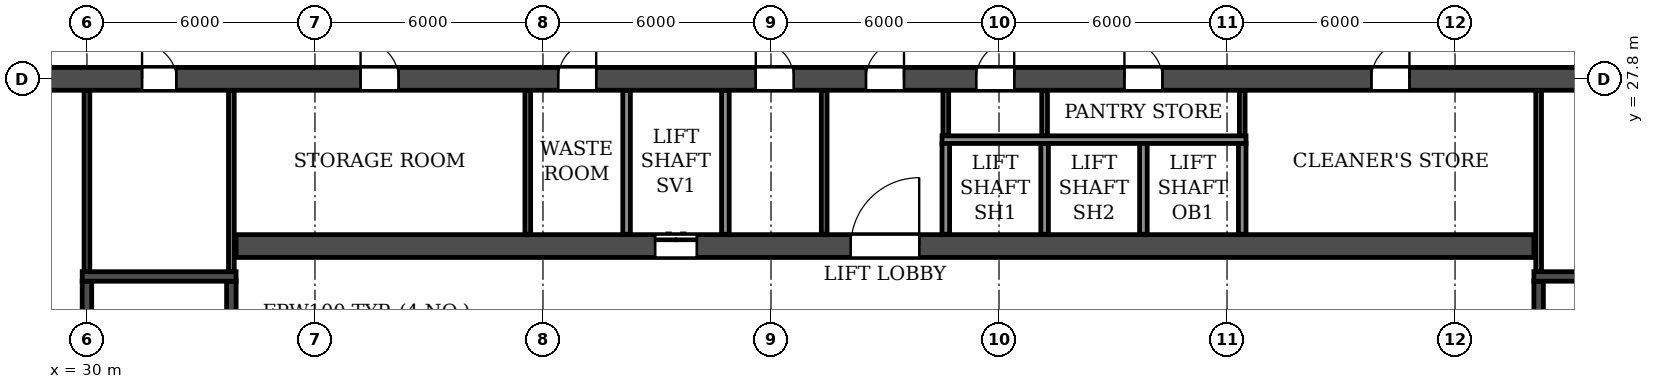
"""IFC4 building model, lengths in metres.
Left out: names, types, materials, properties, quantities, classifications, styles, units other than length and angle.
Written with IfcOpenShell. Run it as: python <this file> out.ifc"""

import sys

from ifc_helpers import new_model, si_unit, direction, frame, frame_2d, origin, place, context, subcontext, project, spatial, rectangle, extrude, element, fill, save


model = new_model("IFC4")
c1 = context("Model", 3, precision=1e-05, world=origin(), true_north=direction((0.0, 1.0)))
c2 = subcontext(c1, "Body", "Model", "MODEL_VIEW")
j1 = project(units=[si_unit("LENGTHUNIT", "METRE"), si_unit("PLANEANGLEUNIT", "RADIAN")], contexts=[c1])
p1 = place(None, origin())
s1 = spatial("IfcSite", under=j1, at=p1, CompositionType="ELEMENT")
p2 = place(p1, origin())
s2 = spatial("IfcBuilding", under=s1, at=p2, CompositionType="ELEMENT")
p3 = place(p2, frame((0.0, 0.0, 33.3)))
s3 = spatial("IfcBuildingStorey", under=s2, at=p3, CompositionType="ELEMENT", Elevation=33.3)
p4 = place(p3, frame((2.6, 27.8, 0.0), z_axis=(0.0, 0.0, 1.0), x_axis=(1.0, 0.0, 0.0)))
e1 = element("IfcWall", 1, at=p4, inside=s3, PredefinedType="SOLIDWALL", context=c2, shape_type="SweptSolid", body=[
    extrude(rectangle(XDim=96.8, YDim=0.6, at=frame_2d((48.4, 0.0))), origin(), (0.0, 0.0, 1.0), 3.05),
])
p5 = place(p4, frame((2.55, 0.0, 0.0)))
e2 = element("IfcOpeningElement", 2, at=p5, cuts=e1, PredefinedType="OPENING", context=c2, shape_type="SweptSolid", body=[
    extrude(rectangle(XDim=1.0, YDim=2.1, at=frame_2d((0.5, 1.05))), frame((0.0, 0.31, 0.0), z_axis=(0.0, -1.0, 0.0), x_axis=(1.0, 0.0, 0.0)), (0.0, 0.0, 1.0), 0.62),
])
p6 = place(p4, frame((10.25, 0.0, 0.0)))
e3 = element("IfcOpeningElement", 3, at=p6, cuts=e1, PredefinedType="OPENING", context=c2, shape_type="SweptSolid", body=[
    extrude(rectangle(XDim=1.0, YDim=2.1, at=frame_2d((0.5, 1.05))), frame((0.0, 0.31, 0.0), z_axis=(0.0, -1.0, 0.0), x_axis=(1.0, 0.0, 0.0)), (0.0, 0.0, 1.0), 0.62),
])
p7 = place(p4, frame((16.3, 0.0, 0.0)))
e4 = element("IfcOpeningElement", 4, at=p7, cuts=e1, PredefinedType="OPENING", context=c2, shape_type="SweptSolid", body=[
    extrude(rectangle(XDim=1.0, YDim=2.1, at=frame_2d((0.5, 1.05))), frame((0.0, 0.31, 0.0), z_axis=(0.0, -1.0, 0.0), x_axis=(1.0, 0.0, 0.0)), (0.0, 0.0, 1.0), 0.62),
])
p8 = place(p4, frame((19.65, 0.0, 0.0)))
e5 = element("IfcOpeningElement", 5, at=p8, cuts=e1, PredefinedType="OPENING", context=c2, shape_type="SweptSolid", body=[
    extrude(rectangle(XDim=0.9, YDim=2.1, at=frame_2d((0.45, 1.05))), frame((0.0, 0.31, 0.0), z_axis=(0.0, -1.0, 0.0), x_axis=(1.0, 0.0, 0.0)), (0.0, 0.0, 1.0), 0.62),
])
p9 = place(p4, frame((28.85, 0.0, 0.0)))
e6 = element("IfcOpeningElement", 6, at=p9, cuts=e1, PredefinedType="OPENING", context=c2, shape_type="SweptSolid", body=[
    extrude(rectangle(XDim=0.9, YDim=2.1, at=frame_2d((0.45, 1.05))), frame((0.0, 0.31, 0.0), z_axis=(0.0, -1.0, 0.0), x_axis=(1.0, 0.0, 0.0)), (0.0, 0.0, 1.0), 0.62),
])
p10 = place(p4, frame((34.6, 0.0, 0.0)))
e7 = element("IfcOpeningElement", 7, at=p10, cuts=e1, PredefinedType="OPENING", context=c2, shape_type="SweptSolid", body=[
    extrude(rectangle(XDim=1.0, YDim=2.1, at=frame_2d((0.5, 1.05))), frame((0.0, 0.31, 0.0), z_axis=(0.0, -1.0, 0.0), x_axis=(1.0, 0.0, 0.0)), (0.0, 0.0, 1.0), 0.62),
])
p11 = place(p4, frame((39.8, 0.0, 0.0)))
e8 = element("IfcOpeningElement", 8, at=p11, cuts=e1, PredefinedType="OPENING", context=c2, shape_type="SweptSolid", body=[
    extrude(rectangle(XDim=1.0, YDim=2.1, at=frame_2d((0.5, 1.05))), frame((0.0, 0.31, 0.0), z_axis=(0.0, -1.0, 0.0), x_axis=(1.0, 0.0, 0.0)), (0.0, 0.0, 1.0), 0.62),
])
p12 = place(p4, frame((45.0, 0.0, 0.0)))
e9 = element("IfcOpeningElement", 9, at=p12, cuts=e1, PredefinedType="OPENING", context=c2, shape_type="SweptSolid", body=[
    extrude(rectangle(XDim=1.0, YDim=2.1, at=frame_2d((0.5, 1.05))), frame((0.0, 0.31, 0.0), z_axis=(0.0, -1.0, 0.0), x_axis=(1.0, 0.0, 0.0)), (0.0, 0.0, 1.0), 0.62),
])
p13 = place(p4, frame((47.9, 0.0, 0.0)))
e10 = element("IfcOpeningElement", 10, at=p13, cuts=e1, PredefinedType="OPENING", context=c2, shape_type="SweptSolid", body=[
    extrude(rectangle(XDim=1.0, YDim=2.1, at=frame_2d((0.5, 1.05))), frame((0.0, 0.31, 0.0), z_axis=(0.0, -1.0, 0.0), x_axis=(1.0, 0.0, 0.0)), (0.0, 0.0, 1.0), 0.62),
])
p14 = place(p4, frame((50.8, 0.0, 0.0)))
e11 = element("IfcOpeningElement", 11, at=p14, cuts=e1, PredefinedType="OPENING", context=c2, shape_type="SweptSolid", body=[
    extrude(rectangle(XDim=1.0, YDim=2.1, at=frame_2d((0.5, 1.05))), frame((0.0, 0.31, 0.0), z_axis=(0.0, -1.0, 0.0), x_axis=(1.0, 0.0, 0.0)), (0.0, 0.0, 1.0), 0.62),
])
p15 = place(p4, frame((54.7, 0.0, 0.0)))
e12 = element("IfcOpeningElement", 12, at=p15, cuts=e1, PredefinedType="OPENING", context=c2, shape_type="SweptSolid", body=[
    extrude(rectangle(XDim=1.0, YDim=2.1, at=frame_2d((0.5, 1.05))), frame((0.0, 0.31, 0.0), z_axis=(0.0, -1.0, 0.0), x_axis=(1.0, 0.0, 0.0)), (0.0, 0.0, 1.0), 0.62),
])
p16 = place(p4, frame((61.2, 0.0, 0.0)))
e13 = element("IfcOpeningElement", 13, at=p16, cuts=e1, PredefinedType="OPENING", context=c2, shape_type="SweptSolid", body=[
    extrude(rectangle(XDim=1.0, YDim=2.1, at=frame_2d((0.5, 1.05))), frame((0.0, 0.31, 0.0), z_axis=(0.0, -1.0, 0.0), x_axis=(1.0, 0.0, 0.0)), (0.0, 0.0, 1.0), 0.62),
])
p17 = place(p4, frame((67.05, 0.0, 0.0)))
e14 = element("IfcOpeningElement", 14, at=p17, cuts=e1, PredefinedType="OPENING", context=c2, shape_type="SweptSolid", body=[
    extrude(rectangle(XDim=0.9, YDim=2.1, at=frame_2d((0.45, 1.05))), frame((0.0, 0.31, 0.0), z_axis=(0.0, -1.0, 0.0), x_axis=(1.0, 0.0, 0.0)), (0.0, 0.0, 1.0), 0.62),
])
p18 = place(p4, frame((76.25, 0.0, 0.0)))
e15 = element("IfcOpeningElement", 15, at=p18, cuts=e1, PredefinedType="OPENING", context=c2, shape_type="SweptSolid", body=[
    extrude(rectangle(XDim=0.9, YDim=2.1, at=frame_2d((0.45, 1.05))), frame((0.0, 0.31, 0.0), z_axis=(0.0, -1.0, 0.0), x_axis=(1.0, 0.0, 0.0)), (0.0, 0.0, 1.0), 0.62),
])
p19 = place(p4, frame((79.5, 0.0, 0.0)))
e16 = element("IfcOpeningElement", 16, at=p19, cuts=e1, PredefinedType="OPENING", context=c2, shape_type="SweptSolid", body=[
    extrude(rectangle(XDim=1.0, YDim=2.1, at=frame_2d((0.5, 1.05))), frame((0.0, 0.31, 0.0), z_axis=(0.0, -1.0, 0.0), x_axis=(1.0, 0.0, 0.0)), (0.0, 0.0, 1.0), 0.62),
])
p20 = place(p4, frame((86.05, 0.0, 0.0)))
e17 = element("IfcOpeningElement", 17, at=p20, cuts=e1, PredefinedType="OPENING", context=c2, shape_type="SweptSolid", body=[
    extrude(rectangle(XDim=1.5, YDim=2.1, at=frame_2d((0.75, 1.05))), frame((0.0, 0.31, 0.0), z_axis=(0.0, -1.0, 0.0), x_axis=(1.0, 0.0, 0.0)), (0.0, 0.0, 1.0), 0.62),
])
p21 = place(p4, frame((94.0, 0.0, 0.0)))
e18 = element("IfcOpeningElement", 18, at=p21, cuts=e1, PredefinedType="OPENING", context=c2, shape_type="SweptSolid", body=[
    extrude(rectangle(XDim=1.0, YDim=2.1, at=frame_2d((0.5, 1.05))), frame((0.0, 0.31, 0.0), z_axis=(0.0, -1.0, 0.0), x_axis=(1.0, 0.0, 0.0)), (0.0, 0.0, 1.0), 0.62),
])
p22 = place(p3, frame((33.925, 23.4, 0.0), z_axis=(0.0, 0.0, 1.0), x_axis=(1.0, 0.0, 0.0)))
e19 = element("IfcWall", 19, at=p22, inside=s3, PredefinedType="SOLIDWALL", context=c2, shape_type="SweptSolid", body=[
    extrude(rectangle(XDim=34.15, YDim=0.6, at=frame_2d((17.075, 0.0))), origin(), (0.0, 0.0, 1.0), 3.05),
])
p23 = place(p22, frame((16.175, 0.0, 0.0)))
e20 = element("IfcOpeningElement", 20, at=p23, cuts=e19, PredefinedType="OPENING", context=c2, shape_type="SweptSolid", body=[
    extrude(rectangle(XDim=1.8, YDim=2.1, at=frame_2d((0.9, 1.05))), frame((0.0, 0.31, 0.0), z_axis=(0.0, -1.0, 0.0), x_axis=(1.0, 0.0, 0.0)), (0.0, 0.0, 1.0), 0.62),
])
p24 = place(p22, frame((11.025, 0.0, 0.0)))
e21 = element("IfcOpeningElement", 21, at=p24, cuts=e19, PredefinedType="OPENING", context=c2, shape_type="SweptSolid", body=[
    extrude(rectangle(XDim=1.1, YDim=2.1, at=frame_2d((0.55, 1.05))), frame((0.0, 0.31, 0.0), z_axis=(0.0, -1.0, 0.0), x_axis=(1.0, 0.0, 0.0)), (0.0, 0.0, 1.0), 0.62),
])
p25 = place(p3, frame((30.0, 14.9, 0.0), z_axis=(0.0, 0.0, 1.0), x_axis=(0.0, 1.0, 0.0)))
e22 = element("IfcWall", 22, at=p25, inside=s3, PredefinedType="SOLIDWALL", context=c2, shape_type="SweptSolid", body=[
    extrude(rectangle(XDim=7.575, YDim=0.25, at=frame_2d((3.788, 0.0))), origin(), (0.0, 0.0, 1.0), 3.05),
])
p26 = place(p3, frame((33.8, 14.9, 0.0), z_axis=(0.0, 0.0, 1.0), x_axis=(0.0, 1.0, 0.0)))
e23 = element("IfcWall", 23, at=p26, inside=s3, PredefinedType="SOLIDWALL", context=c2, shape_type="SweptSolid", body=[
    extrude(rectangle(XDim=7.575, YDim=0.25, at=frame_2d((3.788, 0.0))), origin(), (0.0, 0.0, 1.0), 3.05),
])
p27 = place(p26, frame((0.4, 0.0, 0.0)))
e24 = element("IfcOpeningElement", 24, at=p27, cuts=e23, PredefinedType="OPENING", context=c2, shape_type="SweptSolid", body=[
    extrude(rectangle(XDim=1.0, YDim=2.1, at=frame_2d((0.5, 1.05))), frame((0.0, 0.135, 0.0), z_axis=(0.0, -1.0, 0.0), x_axis=(1.0, 0.0, 0.0)), (0.0, 0.0, 1.0), 0.27),
])
p28 = place(p3, frame((29.875, 22.6, 0.0), z_axis=(0.0, 0.0, 1.0), x_axis=(1.0, 0.0, 0.0)))
e25 = element("IfcWall", 25, at=p28, inside=s3, PredefinedType="SOLIDWALL", context=c2, shape_type="SweptSolid", body=[
    extrude(rectangle(XDim=4.05, YDim=0.25, at=frame_2d((2.025, 0.0))), origin(), (0.0, 0.0, 1.0), 3.05),
])
p29 = place(p3, frame((68.2, 14.9, 0.0), z_axis=(0.0, 0.0, 1.0), x_axis=(0.0, 1.0, 0.0)))
e26 = element("IfcWall", 26, at=p29, inside=s3, PredefinedType="SOLIDWALL", context=c2, shape_type="SweptSolid", body=[
    extrude(rectangle(XDim=7.575, YDim=0.25, at=frame_2d((3.788, 0.0))), origin(), (0.0, 0.0, 1.0), 3.05),
])
p30 = place(p29, frame((0.4, 0.0, 0.0)))
e27 = element("IfcOpeningElement", 27, at=p30, cuts=e26, PredefinedType="OPENING", context=c2, shape_type="SweptSolid", body=[
    extrude(rectangle(XDim=1.0, YDim=2.1, at=frame_2d((0.5, 1.05))), frame((0.0, 0.135, 0.0), z_axis=(0.0, -1.0, 0.0), x_axis=(1.0, 0.0, 0.0)), (0.0, 0.0, 1.0), 0.27),
])
p31 = place(p3, frame((68.075, 22.6, 0.0), z_axis=(0.0, 0.0, 1.0), x_axis=(1.0, 0.0, 0.0)))
e28 = element("IfcWall", 28, at=p31, inside=s3, PredefinedType="SOLIDWALL", context=c2, shape_type="SweptSolid", body=[
    extrude(rectangle(XDim=4.05, YDim=0.25, at=frame_2d((2.025, 0.0))), origin(), (0.0, 0.0, 1.0), 3.05),
])
p32 = place(p3, frame((49.4, 23.71, 0.0), z_axis=(0.0, 0.0, 1.0), x_axis=(0.0, 1.0, 0.0)))
e29 = element("IfcWall", 29, at=p32, inside=s3, PredefinedType="PARTITIONING", context=c2, shape_type="SweptSolid", body=[
    extrude(rectangle(XDim=3.78, YDim=0.15, at=frame_2d((1.89, 0.0))), origin(), (0.0, 0.0, 1.0), 3.05),
])
p33 = place(p3, frame((52.6, 26.3, 0.0), z_axis=(0.0, 0.0, 1.0), x_axis=(0.0, 1.0, 0.0)))
e30 = element("IfcWall", 30, at=p33, inside=s3, PredefinedType="PARTITIONING", context=c2, shape_type="SweptSolid", body=[
    extrude(rectangle(XDim=1.19, YDim=0.15, at=frame_2d((0.595, 0.0))), origin(), (0.0, 0.0, 1.0), 3.05),
])
p34 = place(p3, frame((41.6, 23.71, 0.0), z_axis=(0.0, 0.0, 1.0), x_axis=(0.0, 1.0, 0.0)))
e31 = element("IfcWall", 31, at=p34, inside=s3, PredefinedType="PARTITIONING", context=c2, shape_type="SweptSolid", body=[
    extrude(rectangle(XDim=3.78, YDim=0.15, at=frame_2d((1.89, 0.0))), origin(), (0.0, 0.0, 1.0), 3.05),
])
for number, where, z_axis, x_axis in (
    (32, (55.2, 26.3, 0.0), (0.0, 0.0, 1.0), (0.0, 1.0, 0.0)),
    (33, (60.4, 26.3, 0.0), (0.0, 0.0, 1.0), (0.0, 1.0, 0.0)),
):
    element("IfcWall", number, at=place(p3, frame(where, z_axis=z_axis, x_axis=x_axis)), inside=s3, PredefinedType="PARTITIONING", context=c2, shape_type="SweptSolid", body=[
        extrude(rectangle(XDim=1.19, YDim=0.15, at=frame_2d((0.595, 0.0))), origin(), (0.0, 0.0, 1.0), 3.05),
    ])
for number, where, z_axis, x_axis in (
    (34, (30.0, 22.735, 0.0), (0.0, 0.0, 1.0), (0.0, 1.0, 0.0)),
    (35, (33.8, 22.735, 0.0), (0.0, 0.0, 1.0), (0.0, 1.0, 0.0)),
    (36, (68.2, 22.735, 0.0), (0.0, 0.0, 1.0), (0.0, 1.0, 0.0)),
):
    element("IfcWall", number, at=place(p3, frame(where, z_axis=z_axis, x_axis=x_axis)), inside=s3, PredefinedType="PARTITIONING", context=c2, shape_type="SweptSolid", body=[
        extrude(rectangle(XDim=4.755, YDim=0.15, at=frame_2d((2.377, 0.0))), origin(), (0.0, 0.0, 1.0), 3.05),
    ])
p35 = place(p3, frame((52.5, 26.2, 0.0), z_axis=(0.0, 0.0, 1.0), x_axis=(1.0, 0.0, 0.0)))
e37 = element("IfcWall", 37, at=p35, inside=s3, PredefinedType="PARTITIONING", context=c2, shape_type="SweptSolid", body=[
    extrude(rectangle(XDim=8.0, YDim=0.2, at=frame_2d((4.0, 0.0))), origin(), (0.0, 0.0, 1.0), 3.05),
])
for number, where, z_axis, x_axis in (
    (38, (44.2, 23.71, 0.0), (0.0, 0.0, 1.0), (0.0, 1.0, 0.0)),
    (39, (46.8, 23.71, 0.0), (0.0, 0.0, 1.0), (0.0, 1.0, 0.0)),
):
    element("IfcWall", number, at=place(p3, frame(where, z_axis=z_axis, x_axis=x_axis)), inside=s3, PredefinedType="PARTITIONING", context=c2, shape_type="SweptSolid", body=[
        extrude(rectangle(XDim=3.78, YDim=0.2, at=frame_2d((1.89, 0.0))), origin(), (0.0, 0.0, 1.0), 3.05),
    ])
for number, where, z_axis, x_axis in (
    (40, (52.6, 23.71, 0.0), (0.0, 0.0, 1.0), (0.0, 1.0, 0.0)),
    (41, (55.2, 23.71, 0.0), (0.0, 0.0, 1.0), (0.0, 1.0, 0.0)),
    (42, (57.8, 23.71, 0.0), (0.0, 0.0, 1.0), (0.0, 1.0, 0.0)),
    (43, (60.4, 23.71, 0.0), (0.0, 0.0, 1.0), (0.0, 1.0, 0.0)),
):
    element("IfcWall", number, at=place(p3, frame(where, z_axis=z_axis, x_axis=x_axis)), inside=s3, PredefinedType="PARTITIONING", context=c2, shape_type="SweptSolid", body=[
        extrude(rectangle(XDim=2.39, YDim=0.2, at=frame_2d((1.195, 0.0))), origin(), (0.0, 0.0, 1.0), 3.05),
    ])
p36 = place(p9, origin())
e44 = element("IfcDoor", 44, at=p36, inside=s3, OperationType="SINGLE_SWING_LEFT", PredefinedType="DOOR", context=c2, shape_type="SweptSolid", body=[
    extrude(rectangle(XDim=0.9, YDim=2.1, at=frame_2d((0.45, 1.05))), frame((0.0, 0.025, 0.0), z_axis=(0.0, -1.0, 0.0), x_axis=(1.0, 0.0, 0.0)), (0.0, 0.0, 1.0), 0.05),
])
fill(e6, e44)
p37 = place(p10, origin())
e45 = element("IfcDoor", 45, at=p37, inside=s3, OperationType="SINGLE_SWING_LEFT", PredefinedType="DOOR", context=c2, shape_type="SweptSolid", body=[
    extrude(rectangle(XDim=1.0, YDim=2.1, at=frame_2d((0.5, 1.05))), frame((0.0, 0.025, 0.0), z_axis=(0.0, -1.0, 0.0), x_axis=(1.0, 0.0, 0.0)), (0.0, 0.0, 1.0), 0.05),
])
fill(e7, e45)
p38 = place(p11, origin())
e46 = element("IfcDoor", 46, at=p38, inside=s3, OperationType="SINGLE_SWING_RIGHT", PredefinedType="DOOR", context=c2, shape_type="SweptSolid", body=[
    extrude(rectangle(XDim=1.0, YDim=2.1, at=frame_2d((0.5, 1.05))), frame((0.0, 0.025, 0.0), z_axis=(0.0, -1.0, 0.0), x_axis=(1.0, 0.0, 0.0)), (0.0, 0.0, 1.0), 0.05),
])
fill(e8, e46)
p39 = place(p12, origin())
e47 = element("IfcDoor", 47, at=p39, inside=s3, OperationType="SINGLE_SWING_LEFT", PredefinedType="DOOR", context=c2, shape_type="SweptSolid", body=[
    extrude(rectangle(XDim=1.0, YDim=2.1, at=frame_2d((0.5, 1.05))), frame((0.0, 0.025, 0.0), z_axis=(0.0, -1.0, 0.0), x_axis=(1.0, 0.0, 0.0)), (0.0, 0.0, 1.0), 0.05),
])
fill(e9, e47)
p40 = place(p13, origin())
e48 = element("IfcDoor", 48, at=p40, inside=s3, OperationType="SINGLE_SWING_RIGHT", PredefinedType="DOOR", context=c2, shape_type="SweptSolid", body=[
    extrude(rectangle(XDim=1.0, YDim=2.1, at=frame_2d((0.5, 1.05))), frame((0.0, 0.025, 0.0), z_axis=(0.0, -1.0, 0.0), x_axis=(1.0, 0.0, 0.0)), (0.0, 0.0, 1.0), 0.05),
])
fill(e10, e48)
p41 = place(p14, origin())
e49 = element("IfcDoor", 49, at=p41, inside=s3, OperationType="SINGLE_SWING_RIGHT", PredefinedType="DOOR", context=c2, shape_type="SweptSolid", body=[
    extrude(rectangle(XDim=1.0, YDim=2.1, at=frame_2d((0.5, 1.05))), frame((0.0, 0.025, 0.0), z_axis=(0.0, -1.0, 0.0), x_axis=(1.0, 0.0, 0.0)), (0.0, 0.0, 1.0), 0.05),
])
fill(e11, e49)
p42 = place(p15, origin())
e50 = element("IfcDoor", 50, at=p42, inside=s3, OperationType="SINGLE_SWING_LEFT", PredefinedType="DOOR", context=c2, shape_type="SweptSolid", body=[
    extrude(rectangle(XDim=1.0, YDim=2.1, at=frame_2d((0.5, 1.05))), frame((0.0, 0.025, 0.0), z_axis=(0.0, -1.0, 0.0), x_axis=(1.0, 0.0, 0.0)), (0.0, 0.0, 1.0), 0.05),
])
fill(e12, e50)
p43 = place(p16, origin())
e51 = element("IfcDoor", 51, at=p43, inside=s3, OperationType="SINGLE_SWING_RIGHT", PredefinedType="DOOR", context=c2, shape_type="SweptSolid", body=[
    extrude(rectangle(XDim=1.0, YDim=2.1, at=frame_2d((0.5, 1.05))), frame((0.0, 0.025, 0.0), z_axis=(0.0, -1.0, 0.0), x_axis=(1.0, 0.0, 0.0)), (0.0, 0.0, 1.0), 0.05),
])
fill(e13, e51)
p44 = place(p23, origin())
e52 = element("IfcDoor", 52, at=p44, inside=s3, OperationType="DOUBLE_DOOR_SINGLE_SWING", PredefinedType="DOOR", context=c2, shape_type="SweptSolid", body=[
    extrude(rectangle(XDim=1.8, YDim=2.1, at=frame_2d((0.9, 1.05))), frame((0.0, 0.025, 0.0), z_axis=(0.0, -1.0, 0.0), x_axis=(1.0, 0.0, 0.0)), (0.0, 0.0, 1.0), 0.05),
])
fill(e20, e52)
p45 = place(p24, origin())
e53 = element("IfcDoor", 53, at=p45, inside=s3, OperationType="DOUBLE_DOOR_SLIDING", PredefinedType="DOOR", context=c2, shape_type="SweptSolid", body=[
    extrude(rectangle(XDim=1.1, YDim=2.1, at=frame_2d((0.55, 1.05))), frame((0.0, 0.025, 0.0), z_axis=(0.0, -1.0, 0.0), x_axis=(1.0, 0.0, 0.0)), (0.0, 0.0, 1.0), 0.05),
])
fill(e21, e53)
save(model, sys.argv[1])
